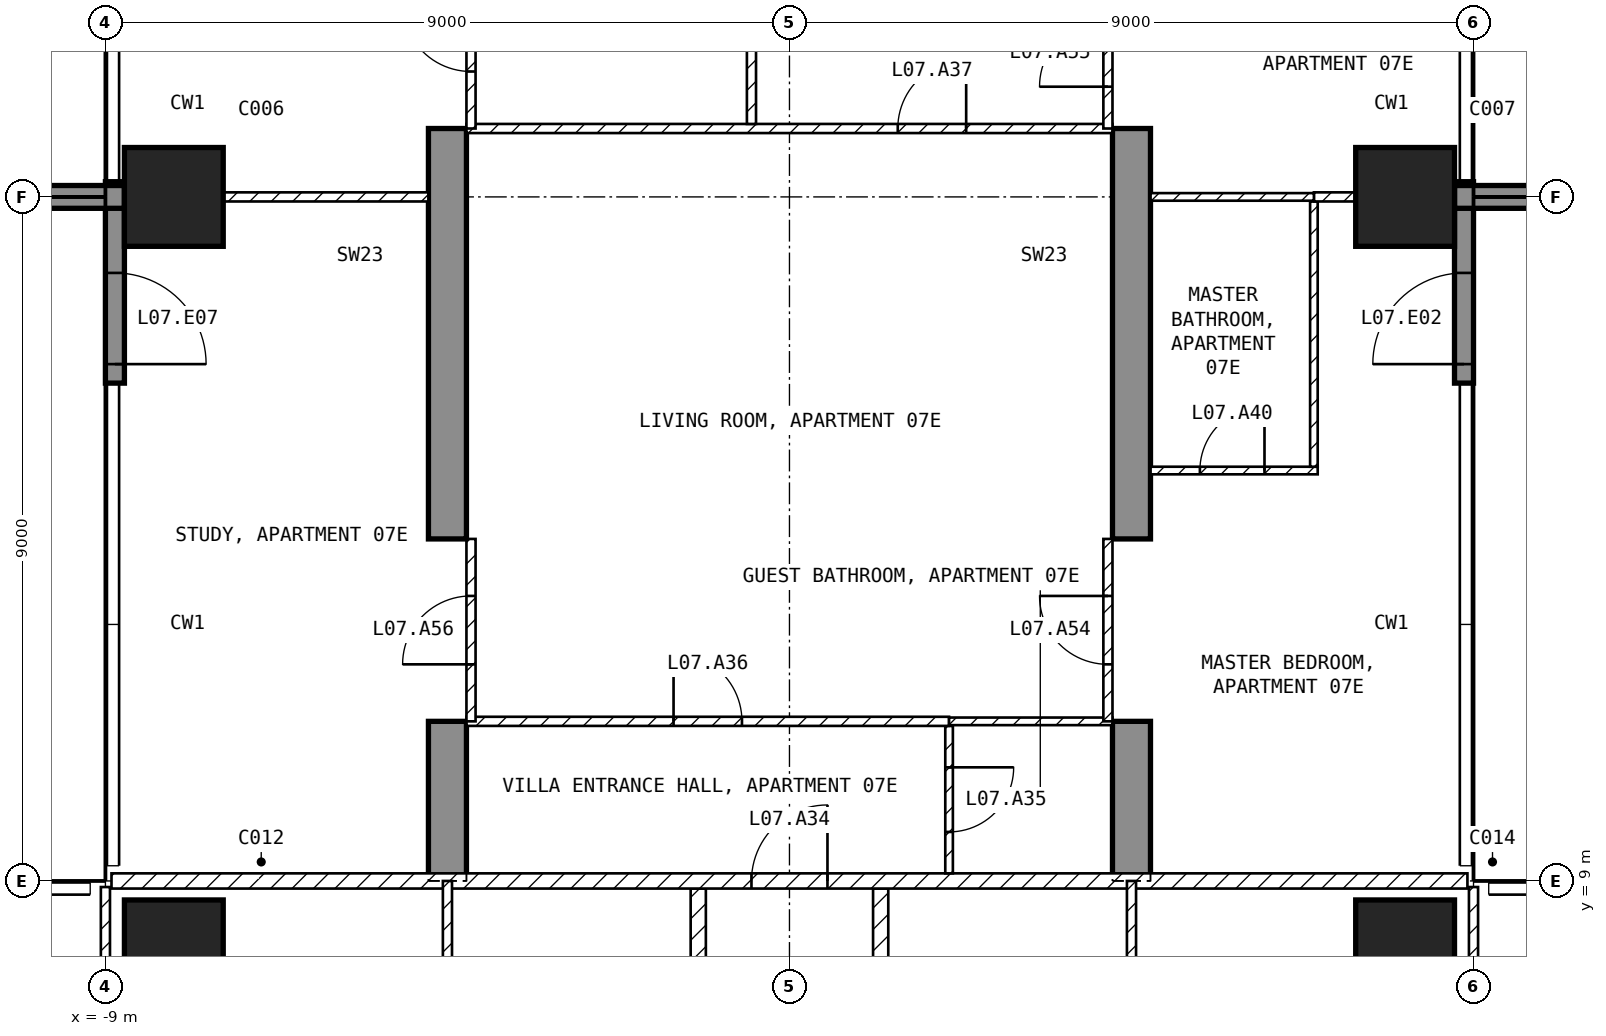
"""IFC4 building model, lengths in metres.
Left out: names, types, materials, properties, quantities, classifications, styles, units other than length and angle.
Written with IfcOpenShell. Run it as: python <this file> out.ifc"""

import sys

from ifc_helpers import new_model, si_unit, direction, frame, frame_2d, origin, origin_2d, place, context, subcontext, project, spatial, polyline, rectangle, outline, extrude, element, fill, save


model = new_model("IFC4")
c1 = context("Model", 3, precision=1e-05, world=origin(), true_north=direction((0.0, 1.0)))
c2 = subcontext(c1, "Body", "Model", "MODEL_VIEW")
j1 = project(units=[si_unit("LENGTHUNIT", "METRE"), si_unit("PLANEANGLEUNIT", "RADIAN")], contexts=[c1])
p1 = place(None, origin())
s1 = spatial("IfcSite", under=j1, at=p1, CompositionType="ELEMENT")
p2 = place(p1, origin())
s2 = spatial("IfcBuilding", under=s1, at=p2, CompositionType="ELEMENT")
p3 = place(p2, frame((0.0, 0.0, 43.5)))
s3 = spatial("IfcBuildingStorey", under=s2, at=p3, CompositionType="ELEMENT", Elevation=43.5)
for number, where, z_axis, x_axis in (
    (1, (-8.1, 8.1, -0.25), (0.0, 0.0, 1.0), (1.0, 0.0, 0.0)),
    (2, (-8.1, 18.0, -0.25), (0.0, 0.0, 1.0), (1.0, 0.0, 0.0)),
    (3, (8.1, 8.1, -0.25), (0.0, 0.0, 1.0), (1.0, 0.0, 0.0)),
    (4, (8.1, 18.0, -0.25), (0.0, 0.0, 1.0), (1.0, 0.0, 0.0)),
):
    element("IfcColumn", number, at=place(p3, frame(where, z_axis=z_axis, x_axis=x_axis)), inside=s3, PredefinedType="COLUMN", context=c2, shape_type="SweptSolid", body=[
        extrude(rectangle(XDim=1.3, YDim=1.3, at=origin_2d()), origin(), (0.0, 0.0, 1.0), 3.5),
    ])
for number, where, z_axis, x_axis in (
    (5, (-4.75, 9.0, -0.25), (1.0, 0.0, 0.0), (0.0, 1.0, 0.0)),
    (6, (4.25, 9.0, -0.25), (1.0, 0.0, 0.0), (0.0, 1.0, 0.0)),
):
    element("IfcWall", number, at=place(p3, frame(where, z_axis=z_axis, x_axis=x_axis)), inside=s3, PredefinedType="SHEAR", context=c2, shape_type="SweptSolid", body=[
        extrude(outline(polyline([(0.0, 0.0), (2.1, 0.0), (2.1, 2.65), (4.5, 2.65), (4.5, 0.0), (9.9, 0.0), (9.9, 2.65), (12.3, 2.65), (12.3, 0.0), (16.45, 0.0), (16.45, 3.5), (0.0, 3.5), (0.0, 0.0)])), origin(), (0.0, 0.0, 1.0), 0.5),
    ])
p4 = place(p3, frame((8.875, 15.55, 0.0), z_axis=(0.0, 0.0, 1.0), x_axis=(0.0, 1.0, 0.0)))
e7 = element("IfcWall", 7, at=p4, inside=s3, PredefinedType="SOLIDWALL", context=c2, shape_type="SweptSolid", body=[
    extrude(rectangle(XDim=2.65, YDim=0.25, at=frame_2d((1.325, 0.0))), origin(), (0.0, 0.0, 1.0), 3.25),
])
p5 = place(p4, frame((0.25, 0.0, 0.0)))
e8 = element("IfcOpeningElement", 8, at=p5, cuts=e7, PredefinedType="OPENING", context=c2, shape_type="SweptSolid", body=[
    extrude(rectangle(XDim=1.2, YDim=2.4, at=frame_2d((0.6, 1.2))), frame((0.0, 0.135, 0.0), z_axis=(0.0, -1.0, 0.0), x_axis=(1.0, 0.0, 0.0)), (0.0, 0.0, 1.0), 0.27),
])
p6 = place(p3, frame((-8.875, 18.2, 0.0), z_axis=(0.0, 0.0, 1.0), x_axis=(0.0, -1.0, 0.0)))
e9 = element("IfcWall", 9, at=p6, inside=s3, PredefinedType="SOLIDWALL", context=c2, shape_type="SweptSolid", body=[
    extrude(rectangle(XDim=2.65, YDim=0.25, at=frame_2d((1.325, 0.0))), origin(), (0.0, 0.0, 1.0), 3.25),
])
p7 = place(p6, frame((1.2, 0.0, 0.0)))
e10 = element("IfcOpeningElement", 10, at=p7, cuts=e9, PredefinedType="OPENING", context=c2, shape_type="SweptSolid", body=[
    extrude(rectangle(XDim=1.2, YDim=2.4, at=frame_2d((0.6, 1.2))), frame((0.0, 0.135, 0.0), z_axis=(0.0, -1.0, 0.0), x_axis=(1.0, 0.0, 0.0)), (0.0, 0.0, 1.0), 0.27),
])
for number, where, z_axis, x_axis in (
    (11, (-8.75, 18.0, 0.0), (0.0, 0.0, 1.0), (-1.0, 0.0, 0.0)),
    (12, (8.75, 18.0, 0.0), (0.0, 0.0, 1.0), (1.0, 0.0, 0.0)),
):
    element("IfcWall", number, at=place(p3, frame(where, z_axis=z_axis, x_axis=x_axis)), inside=s3, PredefinedType="SOLIDWALL", context=c2, shape_type="SweptSolid", body=[
        extrude(rectangle(XDim=2.95, YDim=0.3, at=frame_2d((1.475, 0.0))), origin(), (0.0, 0.0, 1.0), 3.25),
    ])
for number, where, z_axis, x_axis in (
    (13, (1.2, 8.9, 0.0), (0.0, 0.0, 1.0), (0.0, -1.0, 0.0)),
    (14, (-1.2, 1.3, 0.0), (0.0, 0.0, 1.0), (0.0, 1.0, 0.0)),
):
    element("IfcWall", number, at=place(p3, frame(where, z_axis=z_axis, x_axis=x_axis)), inside=s3, PredefinedType="PARTITIONING", context=c2, shape_type="SweptSolid", body=[
        extrude(rectangle(XDim=7.6, YDim=0.2, at=frame_2d((3.8, 0.0))), origin(), (0.0, 0.0, 1.0), 3.25),
    ])
p8 = place(p3, frame((-8.92, 9.0, 0.0), z_axis=(0.0, 0.0, 1.0), x_axis=(1.0, 0.0, 0.0)))
e15 = element("IfcWall", 15, at=p8, inside=s3, PredefinedType="PARTITIONING", context=c2, shape_type="SweptSolid", body=[
    extrude(rectangle(XDim=17.84, YDim=0.2, at=frame_2d((8.92, 0.0))), origin(), (0.0, 0.0, 1.0), 3.25),
])
p9 = place(p8, frame((8.42, 0.0, 0.0)))
e16 = element("IfcOpeningElement", 16, at=p9, cuts=e15, PredefinedType="OPENING", context=c2, shape_type="SweptSolid", body=[
    extrude(rectangle(XDim=1.0, YDim=2.1, at=frame_2d((0.5, 1.05))), frame((0.0, 0.11, 0.0), z_axis=(0.0, -1.0, 0.0), x_axis=(1.0, 0.0, 0.0)), (0.0, 0.0, 1.0), 0.22),
])
p10 = place(p3, frame((9.0, 1.3, 0.0), z_axis=(0.0, 0.0, 1.0), x_axis=(0.0, 1.0, 0.0)))
e17 = element("IfcWall", 17, at=p10, inside=s3, PredefinedType="PARTITIONING", context=c2, shape_type="SweptSolid", body=[
    extrude(rectangle(XDim=7.62, YDim=0.12, at=frame_2d((3.81, 0.0))), origin(), (0.0, 0.0, 1.0), 3.25),
])
p11 = place(p10, frame((0.4, 0.0, 0.0)))
e18 = element("IfcOpeningElement", 18, at=p11, cuts=e17, PredefinedType="OPENING", context=c2, shape_type="SweptSolid", body=[
    extrude(rectangle(XDim=0.9, YDim=2.1, at=frame_2d((0.45, 1.05))), frame((0.0, 0.07, 0.0), z_axis=(0.0, -1.0, 0.0), x_axis=(1.0, 0.0, 0.0)), (0.0, 0.0, 1.0), 0.14),
])
p12 = place(p3, frame((4.5, 5.1, 0.0), z_axis=(0.0, 0.0, 1.0), x_axis=(0.0, 1.0, 0.0)))
e19 = element("IfcWall", 19, at=p12, inside=s3, PredefinedType="PARTITIONING", context=c2, shape_type="SweptSolid", body=[
    extrude(rectangle(XDim=3.9, YDim=0.12, at=frame_2d((1.95, 0.0))), origin(), (0.0, 0.0, 1.0), 3.25),
])
p13 = place(p12, frame((1.5, 0.0, 0.0)))
e20 = element("IfcOpeningElement", 20, at=p13, cuts=e19, PredefinedType="OPENING", context=c2, shape_type="SweptSolid", body=[
    extrude(rectangle(XDim=0.9, YDim=2.1, at=frame_2d((0.45, 1.05))), frame((0.0, 0.07, 0.0), z_axis=(0.0, -1.0, 0.0), x_axis=(1.0, 0.0, 0.0)), (0.0, 0.0, 1.0), 0.14),
])
p14 = place(p3, frame((-9.0, 8.92, 0.0), z_axis=(0.0, 0.0, 1.0), x_axis=(0.0, -1.0, 0.0)))
e21 = element("IfcWall", 21, at=p14, inside=s3, PredefinedType="PARTITIONING", context=c2, shape_type="SweptSolid", body=[
    extrude(rectangle(XDim=5.02, YDim=0.12, at=frame_2d((2.51, 0.0))), origin(), (0.0, 0.0, 1.0), 3.25),
])
p15 = place(p14, frame((2.682, 0.0, 0.0)))
e22 = element("IfcOpeningElement", 22, at=p15, cuts=e21, PredefinedType="OPENING", context=c2, shape_type="SweptSolid", body=[
    extrude(rectangle(XDim=0.9, YDim=2.1, at=frame_2d((0.45, 1.05))), frame((0.0, 0.07, 0.0), z_axis=(0.0, -1.0, 0.0), x_axis=(1.0, 0.0, 0.0)), (0.0, 0.0, 1.0), 0.14),
])
p16 = place(p3, frame((-4.5, 9.0, 0.0), z_axis=(0.0, 0.0, 1.0), x_axis=(0.0, -1.0, 0.0)))
e23 = element("IfcWall", 23, at=p16, inside=s3, PredefinedType="PARTITIONING", context=c2, shape_type="SweptSolid", body=[
    extrude(rectangle(XDim=7.7, YDim=0.12, at=frame_2d((3.85, 0.0))), origin(), (0.0, 0.0, 1.0), 3.25),
])
p17 = place(p16, frame((1.812, 0.0, 0.0)))
e24 = element("IfcOpeningElement", 24, at=p17, cuts=e23, PredefinedType="OPENING", context=c2, shape_type="SweptSolid", body=[
    extrude(rectangle(XDim=0.9, YDim=2.1, at=frame_2d((0.45, 1.05))), frame((0.0, 0.07, 0.0), z_axis=(0.0, -1.0, 0.0), x_axis=(1.0, 0.0, 0.0)), (0.0, 0.0, 1.0), 0.14),
])
p18 = place(p3, frame((2.1, 11.04, 0.0), z_axis=(0.0, 0.0, 1.0), x_axis=(0.0, -1.0, 0.0)))
e25 = element("IfcWall", 25, at=p18, inside=s3, PredefinedType="PARTITIONING", context=c2, shape_type="SweptSolid", body=[
    extrude(rectangle(XDim=1.94, YDim=0.1, at=frame_2d((0.97, 0.0))), origin(), (0.0, 0.0, 1.0), 3.25),
])
p19 = place(p18, frame((0.545, 0.0, 0.0)))
e26 = element("IfcOpeningElement", 26, at=p19, cuts=e25, PredefinedType="OPENING", context=c2, shape_type="SweptSolid", body=[
    extrude(rectangle(XDim=0.85, YDim=2.1, at=frame_2d((0.425, 1.05))), frame((0.0, 0.06, 0.0), z_axis=(0.0, -1.0, 0.0), x_axis=(1.0, 0.0, 0.0)), (0.0, 0.0, 1.0), 0.12),
])
p20 = place(p3, frame((-4.25, 11.1, 0.0), z_axis=(0.0, 0.0, 1.0), x_axis=(1.0, 0.0, 0.0)))
e27 = element("IfcWall", 27, at=p20, inside=s3, PredefinedType="PARTITIONING", context=c2, shape_type="SweptSolid", body=[
    extrude(rectangle(XDim=6.35, YDim=0.12, at=frame_2d((3.175, 0.0))), origin(), (0.0, 0.0, 1.0), 3.25),
])
p21 = place(p20, frame((2.725, 0.0, 0.0)))
e28 = element("IfcOpeningElement", 28, at=p21, cuts=e27, PredefinedType="OPENING", context=c2, shape_type="SweptSolid", body=[
    extrude(rectangle(XDim=0.9, YDim=2.1, at=frame_2d((0.45, 1.05))), frame((0.0, 0.07, 0.0), z_axis=(0.0, -1.0, 0.0), x_axis=(1.0, 0.0, 0.0)), (0.0, 0.0, 1.0), 0.14),
])
p22 = place(p3, frame((2.1, 11.1, 0.0), z_axis=(0.0, 0.0, 1.0), x_axis=(1.0, 0.0, 0.0)))
e29 = element("IfcWall", 29, at=p22, inside=s3, PredefinedType="PARTITIONING", context=c2, shape_type="SweptSolid", body=[
    extrude(rectangle(XDim=2.15, YDim=0.1, at=frame_2d((1.075, 0.0))), origin(), (0.0, 0.0, 1.0), 3.25),
])
p23 = place(p3, frame((-4.25, 18.9, 0.0), z_axis=(0.0, 0.0, 1.0), x_axis=(1.0, 0.0, 0.0)))
e30 = element("IfcWall", 30, at=p23, inside=s3, PredefinedType="PARTITIONING", context=c2, shape_type="SweptSolid", body=[
    extrude(rectangle(XDim=8.5, YDim=0.12, at=frame_2d((4.25, 0.0))), origin(), (0.0, 0.0, 1.0), 3.25),
])
p24 = place(p23, frame((5.675, 0.0, 0.0)))
e31 = element("IfcOpeningElement", 31, at=p24, cuts=e30, PredefinedType="OPENING", context=c2, shape_type="SweptSolid", body=[
    extrude(rectangle(XDim=0.9, YDim=2.1, at=frame_2d((0.45, 1.05))), frame((0.0, 0.07, 0.0), z_axis=(0.0, -1.0, 0.0), x_axis=(1.0, 0.0, 0.0)), (0.0, 0.0, 1.0), 0.14),
])
p25 = place(p3, frame((-0.5, 18.96, 0.0), z_axis=(0.0, 0.0, 1.0), x_axis=(0.0, 1.0, 0.0)))
e32 = element("IfcWall", 32, at=p25, inside=s3, PredefinedType="PARTITIONING", context=c2, shape_type="SweptSolid", body=[
    extrude(rectangle(XDim=4.38, YDim=0.12, at=frame_2d((2.19, 0.0))), origin(), (0.0, 0.0, 1.0), 3.25),
])
p26 = place(p25, frame((1.74, 0.0, 0.0)))
e33 = element("IfcOpeningElement", 33, at=p26, cuts=e32, PredefinedType="OPENING", context=c2, shape_type="SweptSolid", body=[
    extrude(rectangle(XDim=0.9, YDim=2.1, at=frame_2d((0.45, 1.05))), frame((0.0, 0.07, 0.0), z_axis=(0.0, -1.0, 0.0), x_axis=(1.0, 0.0, 0.0)), (0.0, 0.0, 1.0), 0.14),
])
p27 = place(p3, frame((4.75, 14.4, 0.0), z_axis=(0.0, 0.0, 1.0), x_axis=(1.0, 0.0, 0.0)))
e34 = element("IfcWall", 34, at=p27, inside=s3, PredefinedType="PARTITIONING", context=c2, shape_type="SweptSolid", body=[
    extrude(rectangle(XDim=2.2, YDim=0.1, at=frame_2d((1.1, 0.0))), origin(), (0.0, 0.0, 1.0), 3.25),
])
p28 = place(p27, frame((0.65, 0.0, 0.0)))
e35 = element("IfcOpeningElement", 35, at=p28, cuts=e34, PredefinedType="OPENING", context=c2, shape_type="SweptSolid", body=[
    extrude(rectangle(XDim=0.85, YDim=2.1, at=frame_2d((0.425, 1.05))), frame((0.0, 0.06, 0.0), z_axis=(0.0, -1.0, 0.0), x_axis=(1.0, 0.0, 0.0)), (0.0, 0.0, 1.0), 0.12),
])
p29 = place(p3, frame((6.9, 14.45, 0.0), z_axis=(0.0, 0.0, 1.0), x_axis=(0.0, 1.0, 0.0)))
e36 = element("IfcWall", 36, at=p29, inside=s3, PredefinedType="PARTITIONING", context=c2, shape_type="SweptSolid", body=[
    extrude(rectangle(XDim=3.49, YDim=0.1, at=frame_2d((1.745, 0.0))), origin(), (0.0, 0.0, 1.0), 3.25),
])
p30 = place(p3, frame((6.9, 18.0, 0.0), z_axis=(0.0, 0.0, 1.0), x_axis=(1.0, 0.0, 0.0)))
e37 = element("IfcWall", 37, at=p30, inside=s3, PredefinedType="PARTITIONING", context=c2, shape_type="SweptSolid", body=[
    extrude(rectangle(XDim=0.55, YDim=0.12, at=frame_2d((0.275, 0.0))), origin(), (0.0, 0.0, 1.0), 2.346),
])
p31 = place(p3, frame((4.75, 18.0, 0.0), z_axis=(0.0, 0.0, 1.0), x_axis=(1.0, 0.0, 0.0)))
e38 = element("IfcWall", 38, at=p31, inside=s3, PredefinedType="PARTITIONING", context=c2, shape_type="SweptSolid", body=[
    extrude(rectangle(XDim=2.15, YDim=0.1, at=frame_2d((1.075, 0.0))), origin(), (0.0, 0.0, 1.0), 2.346),
])
p32 = place(p3, frame((-7.45, 18.0, 0.0), z_axis=(0.0, 0.0, 1.0), x_axis=(1.0, 0.0, 0.0)))
e39 = element("IfcWall", 39, at=p32, inside=s3, PredefinedType="PARTITIONING", context=c2, shape_type="SweptSolid", body=[
    extrude(rectangle(XDim=2.7, YDim=0.12, at=frame_2d((1.35, 0.0))), origin(), (0.0, 0.0, 1.0), 2.346),
])
p33 = place(p3, frame((4.19, 11.1, 0.0), z_axis=(0.0, 0.0, 1.0), x_axis=(0.0, 1.0, 0.0)))
e40 = element("IfcWall", 40, at=p33, inside=s3, PredefinedType="PARTITIONING", context=c2, shape_type="SweptSolid", body=[
    extrude(rectangle(XDim=2.4, YDim=0.12, at=frame_2d((1.2, 0.0))), origin(), (0.0, 0.0, 1.0), 2.4),
])
p34 = place(p33, frame((0.75, 0.0, 0.0)))
e41 = element("IfcOpeningElement", 41, at=p34, cuts=e40, PredefinedType="OPENING", context=c2, shape_type="SweptSolid", body=[
    extrude(rectangle(XDim=0.9, YDim=2.1, at=frame_2d((0.45, 1.05))), frame((0.0, 0.07, 0.0), z_axis=(0.0, -1.0, 0.0), x_axis=(1.0, 0.0, 0.0)), (0.0, 0.0, 1.0), 0.14),
])
p35 = place(p3, frame((4.19, 18.9, 0.0), z_axis=(0.0, 0.0, 1.0), x_axis=(0.0, 1.0, 0.0)))
e42 = element("IfcWall", 42, at=p35, inside=s3, PredefinedType="PARTITIONING", context=c2, shape_type="SweptSolid", body=[
    extrude(rectangle(XDim=2.4, YDim=0.12, at=frame_2d((1.2, 0.0))), origin(), (0.0, 0.0, 1.0), 2.4),
])
p36 = place(p35, frame((0.55, 0.0, 0.0)))
e43 = element("IfcOpeningElement", 43, at=p36, cuts=e42, PredefinedType="OPENING", context=c2, shape_type="SweptSolid", body=[
    extrude(rectangle(XDim=0.9, YDim=2.1, at=frame_2d((0.45, 1.05))), frame((0.0, 0.07, 0.0), z_axis=(0.0, -1.0, 0.0), x_axis=(1.0, 0.0, 0.0)), (0.0, 0.0, 1.0), 0.14),
])
p37 = place(p3, frame((-4.19, 11.1, 0.0), z_axis=(0.0, 0.0, 1.0), x_axis=(0.0, 1.0, 0.0)))
e44 = element("IfcWall", 44, at=p37, inside=s3, PredefinedType="PARTITIONING", context=c2, shape_type="SweptSolid", body=[
    extrude(rectangle(XDim=2.4, YDim=0.12, at=frame_2d((1.2, 0.0))), origin(), (0.0, 0.0, 1.0), 2.4),
])
p38 = place(p37, frame((0.75, 0.0, 0.0)))
e45 = element("IfcOpeningElement", 45, at=p38, cuts=e44, PredefinedType="OPENING", context=c2, shape_type="SweptSolid", body=[
    extrude(rectangle(XDim=0.9, YDim=2.1, at=frame_2d((0.45, 1.05))), frame((0.0, 0.07, 0.0), z_axis=(0.0, -1.0, 0.0), x_axis=(1.0, 0.0, 0.0)), (0.0, 0.0, 1.0), 0.14),
])
p39 = place(p3, frame((-4.19, 18.9, 0.0), z_axis=(0.0, 0.0, 1.0), x_axis=(0.0, 1.0, 0.0)))
e46 = element("IfcWall", 46, at=p39, inside=s3, PredefinedType="PARTITIONING", context=c2, shape_type="SweptSolid", body=[
    extrude(rectangle(XDim=2.4, YDim=0.12, at=frame_2d((1.2, 0.0))), origin(), (0.0, 0.0, 1.0), 2.4),
])
p40 = place(p39, frame((0.75, 0.0, 0.0)))
e47 = element("IfcOpeningElement", 47, at=p40, cuts=e46, PredefinedType="OPENING", context=c2, shape_type="SweptSolid", body=[
    extrude(rectangle(XDim=0.9, YDim=2.1, at=frame_2d((0.45, 1.05))), frame((0.0, 0.07, 0.0), z_axis=(0.0, -1.0, 0.0), x_axis=(1.0, 0.0, 0.0)), (0.0, 0.0, 1.0), 0.14),
])
p41 = place(p5, origin())
e48 = element("IfcDoor", 48, at=p41, inside=s3, OperationType="SINGLE_SWING_LEFT", PredefinedType="DOOR", context=c2, shape_type="SweptSolid", body=[
    extrude(rectangle(XDim=1.2, YDim=2.4, at=frame_2d((0.6, 1.2))), frame((0.0, 0.025, 0.0), z_axis=(0.0, -1.0, 0.0), x_axis=(1.0, 0.0, 0.0)), (0.0, 0.0, 1.0), 0.05),
])
fill(e8, e48)
p42 = place(p7, origin())
e49 = element("IfcDoor", 49, at=p42, inside=s3, OperationType="SINGLE_SWING_RIGHT", PredefinedType="DOOR", context=c2, shape_type="SweptSolid", body=[
    extrude(rectangle(XDim=1.2, YDim=2.4, at=frame_2d((0.6, 1.2))), frame((0.0, 0.025, 0.0), z_axis=(0.0, -1.0, 0.0), x_axis=(1.0, 0.0, 0.0)), (0.0, 0.0, 1.0), 0.05),
])
fill(e10, e49)
p43 = place(p9, origin())
e50 = element("IfcDoor", 50, at=p43, inside=s3, OperationType="SINGLE_SWING_RIGHT", PredefinedType="DOOR", context=c2, shape_type="SweptSolid", body=[
    extrude(rectangle(XDim=1.0, YDim=2.1, at=frame_2d((0.5, 1.05))), frame((0.0, 0.025, 0.0), z_axis=(0.0, -1.0, 0.0), x_axis=(1.0, 0.0, 0.0)), (0.0, 0.0, 1.0), 0.05),
])
fill(e16, e50)
p44 = place(p19, origin())
e51 = element("IfcDoor", 51, at=p44, inside=s3, OperationType="SINGLE_SWING_LEFT", PredefinedType="DOOR", context=c2, shape_type="SweptSolid", body=[
    extrude(rectangle(XDim=0.85, YDim=2.1, at=frame_2d((0.425, 1.05))), frame((0.0, 0.025, 0.0), z_axis=(0.0, -1.0, 0.0), x_axis=(1.0, 0.0, 0.0)), (0.0, 0.0, 1.0), 0.05),
])
fill(e26, e51)
p45 = place(p21, origin())
e52 = element("IfcDoor", 52, at=p45, inside=s3, OperationType="SINGLE_SWING_LEFT", PredefinedType="DOOR", context=c2, shape_type="SweptSolid", body=[
    extrude(rectangle(XDim=0.9, YDim=2.1, at=frame_2d((0.45, 1.05))), frame((0.0, 0.025, 0.0), z_axis=(0.0, -1.0, 0.0), x_axis=(1.0, 0.0, 0.0)), (0.0, 0.0, 1.0), 0.05),
])
fill(e28, e52)
p46 = place(p24, origin())
e53 = element("IfcDoor", 53, at=p46, inside=s3, OperationType="SINGLE_SWING_RIGHT", PredefinedType="DOOR", context=c2, shape_type="SweptSolid", body=[
    extrude(rectangle(XDim=0.9, YDim=2.1, at=frame_2d((0.45, 1.05))), frame((0.0, 0.025, 0.0), z_axis=(0.0, -1.0, 0.0), x_axis=(1.0, 0.0, 0.0)), (0.0, 0.0, 1.0), 0.05),
])
fill(e31, e53)
p47 = place(p28, origin())
e54 = element("IfcDoor", 54, at=p47, inside=s3, OperationType="SINGLE_SWING_RIGHT", PredefinedType="DOOR", context=c2, shape_type="SweptSolid", body=[
    extrude(rectangle(XDim=0.85, YDim=2.1, at=frame_2d((0.425, 1.05))), frame((0.0, 0.025, 0.0), z_axis=(0.0, -1.0, 0.0), x_axis=(1.0, 0.0, 0.0)), (0.0, 0.0, 1.0), 0.05),
])
fill(e35, e54)
p48 = place(p34, origin())
e55 = element("IfcDoor", 55, at=p48, inside=s3, OperationType="SINGLE_SWING_RIGHT", PredefinedType="DOOR", context=c2, shape_type="SweptSolid", body=[
    extrude(rectangle(XDim=0.9, YDim=2.1, at=frame_2d((0.45, 1.05))), frame((0.0, 0.025, 0.0), z_axis=(0.0, -1.0, 0.0), x_axis=(1.0, 0.0, 0.0)), (0.0, 0.0, 1.0), 0.05),
])
fill(e41, e55)
p49 = place(p36, origin())
e56 = element("IfcDoor", 56, at=p49, inside=s3, OperationType="SINGLE_SWING_LEFT", PredefinedType="DOOR", context=c2, shape_type="SweptSolid", body=[
    extrude(rectangle(XDim=0.9, YDim=2.1, at=frame_2d((0.45, 1.05))), frame((0.0, 0.025, 0.0), z_axis=(0.0, -1.0, 0.0), x_axis=(1.0, 0.0, 0.0)), (0.0, 0.0, 1.0), 0.05),
])
fill(e43, e56)
p50 = place(p38, origin())
e57 = element("IfcDoor", 57, at=p50, inside=s3, OperationType="SINGLE_SWING_LEFT", PredefinedType="DOOR", context=c2, shape_type="SweptSolid", body=[
    extrude(rectangle(XDim=0.9, YDim=2.1, at=frame_2d((0.45, 1.05))), frame((0.0, 0.025, 0.0), z_axis=(0.0, -1.0, 0.0), x_axis=(1.0, 0.0, 0.0)), (0.0, 0.0, 1.0), 0.05),
])
fill(e45, e57)
p51 = place(p40, origin())
e58 = element("IfcDoor", 58, at=p51, inside=s3, OperationType="SINGLE_SWING_RIGHT", PredefinedType="DOOR", context=c2, shape_type="SweptSolid", body=[
    extrude(rectangle(XDim=0.9, YDim=2.1, at=frame_2d((0.45, 1.05))), frame((0.0, 0.025, 0.0), z_axis=(0.0, -1.0, 0.0), x_axis=(1.0, 0.0, 0.0)), (0.0, 0.0, 1.0), 0.05),
])
fill(e47, e58)
save(model, sys.argv[1])
